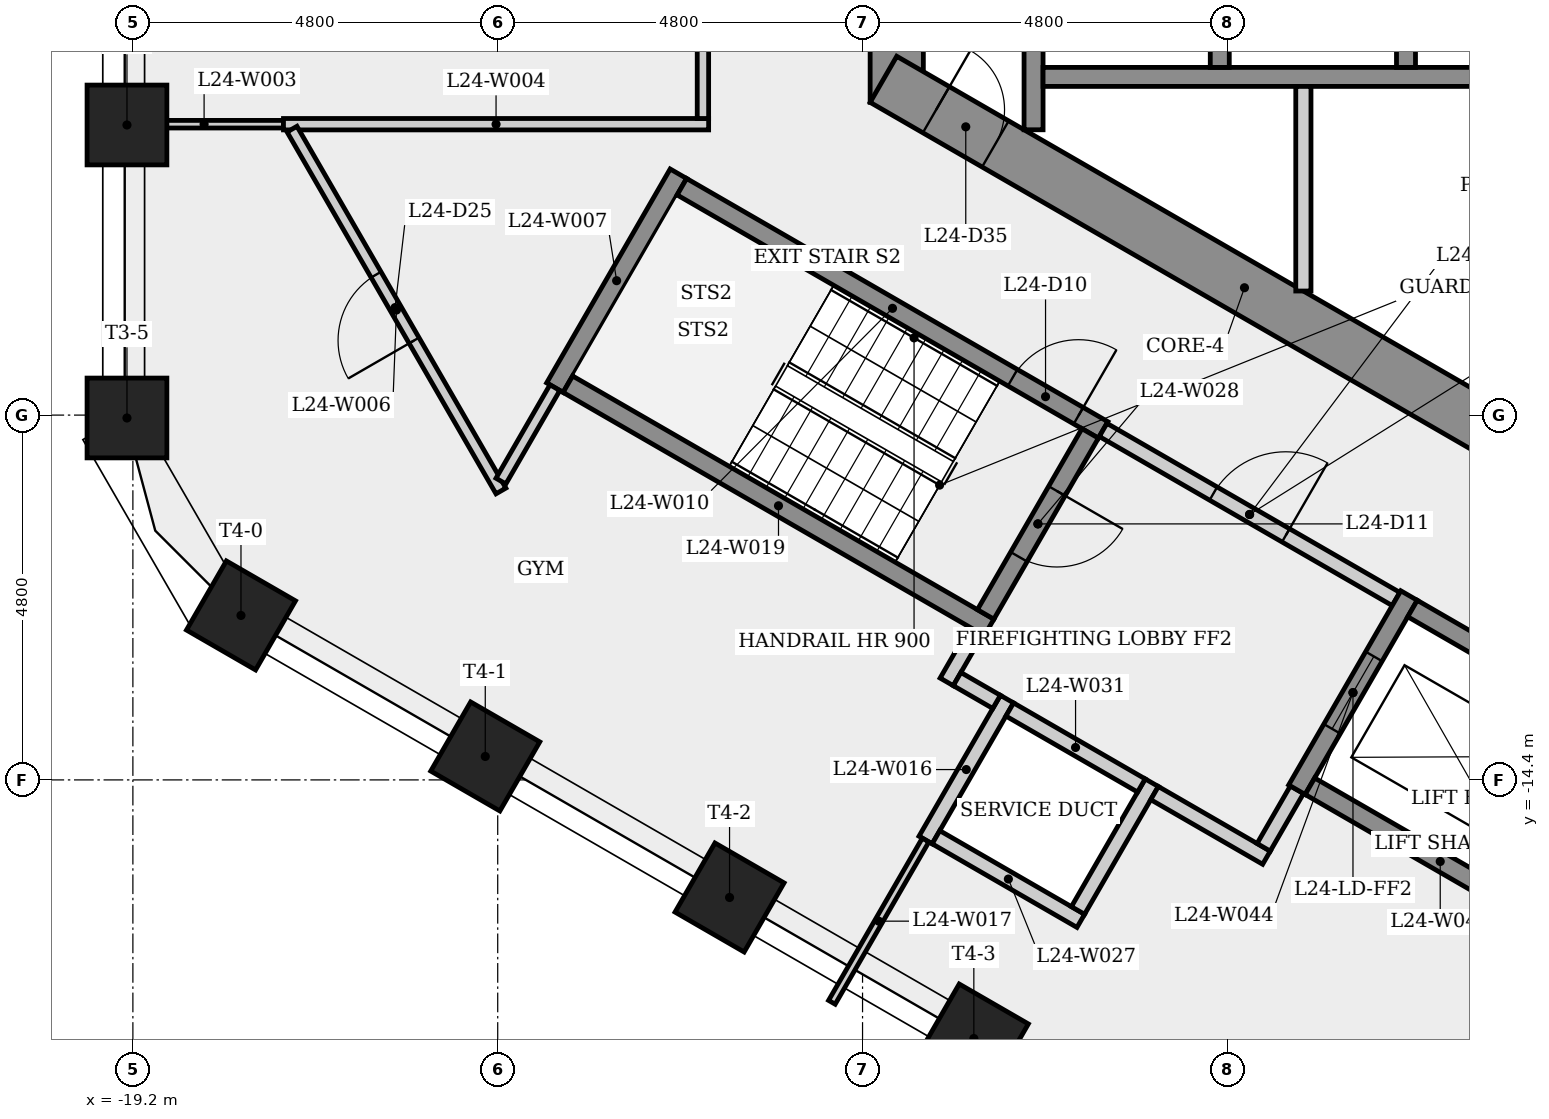
"""IFC4 building model, lengths in metres.
Left out: names, types, materials, properties, quantities, classifications, styles, units other than length and angle.
Written with IfcOpenShell. Run it as: python <this file> out.ifc"""

import sys

from ifc_helpers import new_model, si_unit, direction, frame, frame_2d, origin, origin_2d, place, context, subcontext, project, spatial, rectangle, extrude, element, fill, save


model = new_model("IFC4")
c1 = context("Model", 3, precision=1e-05, world=origin(), true_north=direction((0.0, 1.0)))
c2 = subcontext(c1, "Body", "Model", "MODEL_VIEW")
j1 = project(units=[si_unit("LENGTHUNIT", "METRE"), si_unit("PLANEANGLEUNIT", "RADIAN")], contexts=[c1])
p1 = place(None, origin())
s1 = spatial("IfcSite", under=j1, at=p1, CompositionType="ELEMENT")
p2 = place(p1, origin())
s2 = spatial("IfcBuilding", under=s1, at=p2, CompositionType="ELEMENT")
p3 = place(p2, frame((0.0, 0.0, 93.3)))
s3 = spatial("IfcBuildingStorey", under=s2, at=p3, CompositionType="ELEMENT", Elevation=93.3)
p4 = place(p3, frame((-9.15, 5.485, 0.0), z_axis=(0.0, 0.0, 1.0), x_axis=(0.0, -1.0, 0.0)))
e1 = element("IfcWall", 1, at=p4, inside=s3, PredefinedType="SHEAR", context=c2, shape_type="SweptSolid", body=[
    extrude(rectangle(XDim=10.97, YDim=0.7, at=frame_2d((5.485, 0.0))), origin(), (0.0, 0.0, 1.0), 3.4),
])
p5 = place(p4, frame((4.685, 0.0, 0.0)))
e2 = element("IfcOpeningElement", 2, at=p5, cuts=e1, PredefinedType="OPENING", context=c2, shape_type="SweptSolid", body=[
    extrude(rectangle(XDim=1.6, YDim=2.1, at=frame_2d((0.8, 1.05))), frame((0.0, 0.36, 0.0), z_axis=(0.0, -1.0, 0.0), x_axis=(1.0, 0.0, 0.0)), (0.0, 0.0, 1.0), 0.72),
])
p6 = place(p3, frame((-9.325, -5.182, 0.0), z_axis=(0.0, 0.0, 1.0), x_axis=(0.866023993627, -0.500002442456, 0.0)))
e3 = element("IfcWall", 3, at=p6, inside=s3, PredefinedType="SHEAR", context=c2, shape_type="SweptSolid", body=[
    extrude(rectangle(XDim=10.97, YDim=0.7, at=frame_2d((5.485, 0.0))), origin(), (0.0, 0.0, 1.0), 3.4),
])
p7 = place(p6, frame((0.801, 0.0, 0.0)))
e4 = element("IfcOpeningElement", 4, at=p7, cuts=e3, PredefinedType="OPENING", context=c2, shape_type="SweptSolid", body=[
    extrude(rectangle(XDim=0.9, YDim=2.1, at=frame_2d((0.45, 1.05))), frame((0.0, 0.36, 0.0), z_axis=(0.0, -1.0, 0.0), x_axis=(1.0, 0.0, 0.0)), (0.0, 0.0, 1.0), 0.72),
])
for number, where, z_axis, x_axis in (
    (5, (-19.278, -5.783, 0.0), (0.0, 0.0, 1.0), (-1.0, 0.0, 0.0)),
    (6, (-19.278, -9.638, 0.0), (0.0, 0.0, 1.0), (-1.0, 0.0, 0.0)),
    (7, (-17.778, -12.236, 0.0), (0.0, 0.0, 1.0), (-0.5, -0.866, 0.0)),
    (8, (-14.564, -14.092, 0.0), (0.0, 0.0, 1.0), (-0.5, -0.866, 0.0)),
    (9, (-11.35, -15.947, 0.0), (0.0, 0.0, 1.0), (-0.5, -0.866, 0.0)),
    (10, (-8.136, -17.803, 0.0), (0.0, 0.0, 1.0), (-0.5, -0.866, 0.0)),
):
    element("IfcColumn", number, at=place(p3, frame(where, z_axis=z_axis, x_axis=x_axis)), inside=s3, PredefinedType="COLUMN", context=c2, shape_type="SweptSolid", body=[
        extrude(rectangle(XDim=1.05, YDim=1.05, at=origin_2d()), origin(), (0.0, 0.0, 1.0), 3.4),
    ])
p8 = place(p3, frame((-17.219, -5.772, 0.0), z_axis=(0.0, 0.0, 1.0), x_axis=(-1.0, 0.0, 0.0)))
e11 = element("IfcWall", 11, at=p8, inside=s3, PredefinedType="PARTITIONING", context=c2, shape_type="SweptSolid", body=[
    extrude(rectangle(XDim=2.089, YDim=0.1, at=frame_2d((1.044, 0.0))), origin(), (0.0, 0.0, 1.0), 3.05),
])
p9 = place(p3, frame((-17.219, -5.772, 0.0), z_axis=(0.0, 0.0, 1.0), x_axis=(1.0, 0.0, 0.0)))
e12 = element("IfcWall", 12, at=p9, inside=s3, PredefinedType="PARTITIONING", context=c2, shape_type="SweptSolid", body=[
    extrude(rectangle(XDim=5.594, YDim=0.15, at=frame_2d((2.797, 0.0))), origin(), (0.0, 0.0, 1.0), 3.05),
])
p10 = place(p3, frame((-14.358, -10.598, 0.0), z_axis=(0.0, 0.0, 1.0), x_axis=(-0.499988999718, 0.866031754707, 0.0)))
e13 = element("IfcWall", 13, at=p10, inside=s3, PredefinedType="PARTITIONING", context=c2, shape_type="SweptSolid", body=[
    extrude(rectangle(XDim=5.497, YDim=0.15, at=frame_2d((2.749, 0.0))), origin(), (0.0, 0.0, 1.0), 3.05),
])
p11 = place(p10, frame((2.286, 0.0, 0.0)))
e14 = element("IfcOpeningElement", 14, at=p11, cuts=e13, PredefinedType="OPENING", context=c2, shape_type="SweptSolid", body=[
    extrude(rectangle(XDim=1.0, YDim=2.1, at=frame_2d((0.5, 1.05))), frame((0.0, 0.085, 0.0), z_axis=(0.0, -1.0, 0.0), x_axis=(1.0, 0.0, 0.0)), (0.0, 0.0, 1.0), 0.17),
])
p12 = place(p3, frame((-13.648, -9.239, 0.0), z_axis=(0.0, 0.0, 1.0), x_axis=(0.500017246033, 0.866015446554, 0.0)))
e15 = element("IfcWall", 15, at=p12, inside=s3, PredefinedType="SHEAR", context=c2, shape_type="SweptSolid", body=[
    extrude(rectangle(XDim=3.25, YDim=0.25, at=frame_2d((1.625, 0.0))), origin(), (0.0, 0.0, 1.0), 3.05),
])
p13 = place(p3, frame((-13.648, -9.239, 0.0), z_axis=(0.0, 0.0, 1.0), x_axis=(-0.500059846627, -0.865990848561, 0.0)))
e16 = element("IfcWall", 16, at=p13, inside=s3, PredefinedType="PARTITIONING", context=c2, shape_type="SweptSolid", body=[
    extrude(rectangle(XDim=1.42, YDim=0.15, at=frame_2d((0.71, 0.0))), origin(), (0.0, 0.0, 1.0), 3.05),
])
p14 = place(p3, frame((-11.977, -6.595, 0.0), z_axis=(0.0, 0.0, 1.0), x_axis=(0.866025499775, -0.499999833739, 0.0)))
e17 = element("IfcWall", 17, at=p14, inside=s3, PredefinedType="SHEAR", context=c2, shape_type="SweptSolid", body=[
    extrude(rectangle(XDim=6.4, YDim=0.25, at=frame_2d((3.2, 0.0))), origin(), (0.0, 0.0, 1.0), 3.05),
])
p15 = place(p14, frame((5.025, 0.0, 0.0)))
e18 = element("IfcOpeningElement", 18, at=p15, cuts=e17, PredefinedType="OPENING", context=c2, shape_type="SweptSolid", body=[
    extrude(rectangle(XDim=1.0, YDim=2.1, at=frame_2d((0.5, 1.05))), frame((0.0, 0.135, 0.0), z_axis=(0.0, -1.0, 0.0), x_axis=(1.0, 0.0, 0.0)), (0.0, 0.0, 1.0), 0.27),
])
p16 = place(p3, frame((-11.7, -5.698, 0.0), z_axis=(0.0, 0.0, 1.0), x_axis=(0.0, 1.0, 0.0)))
e19 = element("IfcWall", 19, at=p16, inside=s3, PredefinedType="PARTITIONING", context=c2, shape_type="SweptSolid", body=[
    extrude(rectangle(XDim=11.395, YDim=0.15, at=frame_2d((5.698, 0.0))), origin(), (0.0, 0.0, 1.0), 3.05),
])
p17 = place(p16, frame((8.061, 0.0, 0.0)))
e20 = element("IfcOpeningElement", 20, at=p17, cuts=e19, PredefinedType="OPENING", context=c2, shape_type="SweptSolid", body=[
    extrude(rectangle(XDim=1.0, YDim=2.1, at=frame_2d((0.5, 1.05))), frame((0.0, 0.085, 0.0), z_axis=(0.0, -1.0, 0.0), x_axis=(1.0, 0.0, 0.0)), (0.0, 0.0, 1.0), 0.17),
])
p18 = place(p16, frame((2.334, 0.0, 0.0)))
e21 = element("IfcOpeningElement", 21, at=p18, cuts=e19, PredefinedType="OPENING", context=c2, shape_type="SweptSolid", body=[
    extrude(rectangle(XDim=1.0, YDim=2.1, at=frame_2d((0.5, 1.05))), frame((0.0, 0.085, 0.0), z_axis=(0.0, -1.0, 0.0), x_axis=(1.0, 0.0, 0.0)), (0.0, 0.0, 1.0), 0.17),
])
p19 = place(p3, frame((-8.771, -15.191, 0.0), z_axis=(0.0, 0.0, 1.0), x_axis=(0.500051491514, 0.865995673104, 0.0)))
e22 = element("IfcWall", 22, at=p19, inside=s3, PredefinedType="PLUMBINGWALL", context=c2, shape_type="SweptSolid", body=[
    extrude(rectangle(XDim=2.141, YDim=0.2, at=frame_2d((1.07, 0.0))), origin(), (0.0, 0.0, 1.0), 3.05),
])
p20 = place(p3, frame((-8.771, -15.191, 0.0), z_axis=(0.0, 0.0, 1.0), x_axis=(-0.500036725936, -0.866004199017, 0.0)))
e23 = element("IfcWall", 23, at=p20, inside=s3, PredefinedType="PARTITIONING", context=c2, shape_type="SweptSolid", body=[
    extrude(rectangle(XDim=2.466, YDim=0.1, at=frame_2d((1.233, 0.0))), origin(), (0.0, 0.0, 1.0), 3.05),
])
p21 = place(p3, frame((-8.493, -13.11, 0.0), z_axis=(0.0, 0.0, 1.0), x_axis=(0.500067724834, 0.865986299303, 0.0)))
e24 = element("IfcWall", 24, at=p21, inside=s3, PredefinedType="PARTITIONING", context=c2, shape_type="SweptSolid", body=[
    extrude(rectangle(XDim=0.775, YDim=0.2, at=frame_2d((0.388, 0.0))), origin(), (0.0, 0.0, 1.0), 3.05),
])
p22 = place(p3, frame((-7.935, -12.393, 0.0), z_axis=(0.0, 0.0, 1.0), x_axis=(-0.866025499775, 0.499999833739, 0.0)))
e25 = element("IfcWall", 25, at=p22, inside=s3, PredefinedType="SHEAR", context=c2, shape_type="SweptSolid", body=[
    extrude(rectangle(XDim=6.4, YDim=0.25, at=frame_2d((3.2, 0.0))), origin(), (0.0, 0.0, 1.0), 3.05),
])
p23 = place(p3, frame((-7.836, -13.373, 0.0), z_axis=(0.0, 0.0, 1.0), x_axis=(-0.866232998003, 0.499640263761, 0.0)))
e26 = element("IfcWall", 26, at=p23, inside=s3, PredefinedType="PARTITIONING", context=c2, shape_type="SweptSolid", body=[
    extrude(rectangle(XDim=0.6, YDim=0.2, at=frame_2d((0.3, 0.0))), origin(), (0.0, 0.0, 1.0), 3.05),
])
p24 = place(p3, frame((-7.35, -5.846, 0.0), z_axis=(0.0, 0.0, 1.0), x_axis=(0.0, 1.0, 0.0)))
e27 = element("IfcWall", 27, at=p24, inside=s3, PredefinedType="SHEAR", context=c2, shape_type="SweptSolid", body=[
    extrude(rectangle(XDim=4.171, YDim=0.25, at=frame_2d((2.085, 0.0))), origin(), (0.0, 0.0, 1.0), 3.05),
])
p25 = place(p3, frame((-6.729, -16.254, 0.0), z_axis=(0.0, 0.0, 1.0), x_axis=(-0.86598042715, 0.500077893725, 0.0)))
e28 = element("IfcWall", 28, at=p25, inside=s3, PredefinedType="PLUMBINGWALL", context=c2, shape_type="SweptSolid", body=[
    extrude(rectangle(XDim=2.2, YDim=0.2, at=frame_2d((1.1, 0.0))), origin(), (0.0, 0.0, 1.0), 3.05),
])
p26 = place(p3, frame((-6.605, -9.841, 0.0), z_axis=(0.0, 0.0, 1.0), x_axis=(-0.499996545922, -0.866027397988, 0.0)))
e29 = element("IfcWall", 29, at=p26, inside=s3, PredefinedType="SHEAR", context=c2, shape_type="SweptSolid", body=[
    extrude(rectangle(XDim=2.75, YDim=0.25, at=frame_2d((1.375, 0.0))), origin(), (0.0, 0.0, 1.0), 3.05),
])
p27 = place(p26, frame((0.875, 0.0, 0.0)))
e30 = element("IfcOpeningElement", 30, at=p27, cuts=e29, PredefinedType="OPENING", context=c2, shape_type="SweptSolid", body=[
    extrude(rectangle(XDim=1.0, YDim=2.1, at=frame_2d((0.5, 1.05))), frame((0.0, 0.135, 0.0), z_axis=(0.0, -1.0, 0.0), x_axis=(1.0, 0.0, 0.0)), (0.0, 0.0, 1.0), 0.27),
])
p28 = place(p3, frame((-6.435, -9.795, 0.0), z_axis=(0.0, 0.0, 1.0), x_axis=(0.866012907634, -0.500021643343, 0.0)))
e31 = element("IfcWall", 31, at=p28, inside=s3, PredefinedType="PARTITIONING", context=c2, shape_type="SweptSolid", body=[
    extrude(rectangle(XDim=4.45, YDim=0.2, at=frame_2d((2.225, 0.0))), origin(), (0.0, 0.0, 1.0), 3.05),
])
p29 = place(p28, frame((1.675, 0.0, 0.0)))
e32 = element("IfcOpeningElement", 32, at=p29, cuts=e31, PredefinedType="OPENING", context=c2, shape_type="SweptSolid", body=[
    extrude(rectangle(XDim=1.1, YDim=2.1, at=frame_2d((0.55, 1.05))), frame((0.0, 0.11, 0.0), z_axis=(0.0, -1.0, 0.0), x_axis=(1.0, 0.0, 0.0)), (0.0, 0.0, 1.0), 0.22),
])
p30 = place(p3, frame((-5.795, -14.437, 0.0), z_axis=(0.0, 0.0, 1.0), x_axis=(-0.500034525977, -0.866005469285, 0.0)))
e33 = element("IfcWall", 33, at=p30, inside=s3, PredefinedType="PLUMBINGWALL", context=c2, shape_type="SweptSolid", body=[
    extrude(rectangle(XDim=1.941, YDim=0.2, at=frame_2d((0.971, 0.0))), origin(), (0.0, 0.0, 1.0), 3.05),
])
p31 = place(p3, frame((-5.931, -14.473, 0.0), z_axis=(0.0, 0.0, 1.0), x_axis=(-0.866041268327, 0.499972520799, 0.0)))
e34 = element("IfcWall", 34, at=p31, inside=s3, PredefinedType="PLUMBINGWALL", context=c2, shape_type="SweptSolid", body=[
    extrude(rectangle(XDim=2.0, YDim=0.2, at=frame_2d((1.0, 0.0))), origin(), (0.0, 0.0, 1.0), 3.05),
])
p32 = place(p3, frame((-7.225, -5.15, 0.0), z_axis=(0.0, 0.0, 1.0), x_axis=(1.0, 0.0, 0.0)))
e35 = element("IfcWall", 35, at=p32, inside=s3, PredefinedType="SHEAR", context=c2, shape_type="SweptSolid", body=[
    extrude(rectangle(XDim=14.7, YDim=0.25, at=frame_2d((7.35, 0.0))), origin(), (0.0, 0.0, 1.0), 3.05),
])
p33 = place(p3, frame((-4.9, -1.925, 0.0), z_axis=(0.0, 0.0, 1.0), x_axis=(0.0, -1.0, 0.0)))
e36 = element("IfcWall", 36, at=p33, inside=s3, PredefinedType="SHEAR", context=c2, shape_type="SweptSolid", body=[
    extrude(rectangle(XDim=3.1, YDim=0.25, at=frame_2d((1.55, 0.0))), origin(), (0.0, 0.0, 1.0), 3.4),
])
p34 = place(p3, frame((-4.286, -15.423, 0.0), z_axis=(0.0, 0.0, 1.0), x_axis=(-0.866025371046, 0.500000056704, 0.0)))
e37 = element("IfcWall", 37, at=p34, inside=s3, PredefinedType="PARTITIONING", context=c2, shape_type="SweptSolid", body=[
    extrude(rectangle(XDim=1.7, YDim=0.2, at=frame_2d((0.85, 0.0))), origin(), (0.0, 0.0, 1.0), 3.05),
])
p35 = place(p3, frame((-3.885, -14.529, 0.0), z_axis=(0.0, 0.0, 1.0), x_axis=(-0.499859285417, -0.866106630146, 0.0)))
e38 = element("IfcWall", 38, at=p35, inside=s3, PredefinedType="PARTITIONING", context=c2, shape_type="SweptSolid", body=[
    extrude(rectangle(XDim=0.875, YDim=0.2, at=frame_2d((0.438, 0.0))), origin(), (0.0, 0.0, 1.0), 3.05),
])
p36 = place(p3, frame((-3.8, -5.275, 0.0), z_axis=(0.0, 0.0, 1.0), x_axis=(0.0, -1.0, 0.0)))
e39 = element("IfcWall", 39, at=p36, inside=s3, PredefinedType="PARTITIONING", context=c2, shape_type="SweptSolid", body=[
    extrude(rectangle(XDim=2.692, YDim=0.2, at=frame_2d((1.346, 0.0))), origin(), (0.0, 0.0, 1.0), 3.05),
])
p37 = place(p3, frame((-2.41, -11.974, 0.0), z_axis=(0.0, 0.0, 1.0), x_axis=(-0.500001826776, -0.866024349092, 0.0)))
e40 = element("IfcWall", 40, at=p37, inside=s3, PredefinedType="SHEAR", context=c2, shape_type="SweptSolid", body=[
    extrude(rectangle(XDim=2.95, YDim=0.25, at=frame_2d((1.475, 0.0))), origin(), (0.0, 0.0, 1.0), 3.05),
])
p38 = place(p37, frame((0.925, 0.0, 0.0)))
e41 = element("IfcOpeningElement", 41, at=p38, cuts=e40, PredefinedType="OPENING", context=c2, shape_type="SweptSolid", body=[
    extrude(rectangle(XDim=1.1, YDim=2.1, at=frame_2d((0.55, 1.05))), frame((0.0, 0.135, 0.0), z_axis=(0.0, -1.0, 0.0), x_axis=(1.0, 0.0, 0.0)), (0.0, 0.0, 1.0), 0.27),
])
p39 = place(p3, frame((-2.364, -12.145, 0.0), z_axis=(0.0, 0.0, 1.0), x_axis=(0.86603892542, -0.499976579108, 0.0)))
e42 = element("IfcWall", 42, at=p39, inside=s3, PredefinedType="SHEAR", context=c2, shape_type="SweptSolid", body=[
    extrude(rectangle(XDim=2.162, YDim=0.25, at=frame_2d((1.081, 0.0))), origin(), (0.0, 0.0, 1.0), 3.05),
])
p40 = place(p3, frame((-2.45, -1.925, 0.0), z_axis=(0.0, 0.0, 1.0), x_axis=(0.0, -1.0, 0.0)))
e43 = element("IfcWall", 43, at=p40, inside=s3, PredefinedType="SHEAR", context=c2, shape_type="SweptSolid", body=[
    extrude(rectangle(XDim=3.1, YDim=0.25, at=frame_2d((1.55, 0.0))), origin(), (0.0, 0.0, 1.0), 3.4),
])
p41 = place(p3, frame((-0.856, -16.133, 0.0), z_axis=(0.0, 0.0, 1.0), x_axis=(-0.866021716278, 0.500006386895, 0.0)))
e44 = element("IfcWall", 44, at=p41, inside=s3, PredefinedType="SHEAR", context=c2, shape_type="SweptSolid", body=[
    extrude(rectangle(XDim=3.3, YDim=0.25, at=frame_2d((1.65, 0.0))), origin(), (0.0, 0.0, 1.0), 3.05),
])
p42 = place(p15, origin())
e45 = element("IfcDoor", 45, at=p42, inside=s3, OperationType="SINGLE_SWING_RIGHT", PredefinedType="DOOR", context=c2, shape_type="SweptSolid", body=[
    extrude(rectangle(XDim=1.0, YDim=2.1, at=frame_2d((0.5, 1.05))), frame((0.0, 0.025, 0.0), z_axis=(0.0, -1.0, 0.0), x_axis=(1.0, 0.0, 0.0)), (0.0, 0.0, 1.0), 0.05),
])
fill(e18, e45)
p43 = place(p27, origin())
e46 = element("IfcDoor", 46, at=p43, inside=s3, OperationType="SINGLE_SWING_LEFT", PredefinedType="DOOR", context=c2, shape_type="SweptSolid", body=[
    extrude(rectangle(XDim=1.0, YDim=2.1, at=frame_2d((0.5, 1.05))), frame((0.0, 0.025, 0.0), z_axis=(0.0, -1.0, 0.0), x_axis=(1.0, 0.0, 0.0)), (0.0, 0.0, 1.0), 0.05),
])
fill(e30, e46)
p44 = place(p29, origin())
e47 = element("IfcDoor", 47, at=p44, inside=s3, OperationType="SINGLE_SWING_RIGHT", PredefinedType="DOOR", context=c2, shape_type="SweptSolid", body=[
    extrude(rectangle(XDim=1.1, YDim=2.1, at=frame_2d((0.55, 1.05))), frame((0.0, 0.025, 0.0), z_axis=(0.0, -1.0, 0.0), x_axis=(1.0, 0.0, 0.0)), (0.0, 0.0, 1.0), 0.05),
])
fill(e32, e47)
p45 = place(p38, origin())
e48 = element("IfcDoor", 48, at=p45, inside=s3, OperationType="SLIDING_TO_LEFT", PredefinedType="DOOR", context=c2, shape_type="SweptSolid", body=[
    extrude(rectangle(XDim=1.1, YDim=2.1, at=frame_2d((0.55, 1.05))), frame((0.0, 0.025, 0.0), z_axis=(0.0, -1.0, 0.0), x_axis=(1.0, 0.0, 0.0)), (0.0, 0.0, 1.0), 0.05),
])
fill(e41, e48)
p46 = place(p11, origin())
e49 = element("IfcDoor", 49, at=p46, inside=s3, OperationType="SINGLE_SWING_LEFT", PredefinedType="DOOR", context=c2, shape_type="SweptSolid", body=[
    extrude(rectangle(XDim=1.0, YDim=2.1, at=frame_2d((0.5, 1.05))), frame((0.0, 0.025, 0.0), z_axis=(0.0, -1.0, 0.0), x_axis=(1.0, 0.0, 0.0)), (0.0, 0.0, 1.0), 0.05),
])
fill(e14, e49)
p47 = place(p7, origin())
e50 = element("IfcDoor", 50, at=p47, inside=s3, OperationType="SINGLE_SWING_LEFT", PredefinedType="DOOR", context=c2, shape_type="SweptSolid", body=[
    extrude(rectangle(XDim=0.9, YDim=2.1, at=frame_2d((0.45, 1.05))), frame((0.0, 0.025, 0.0), z_axis=(0.0, -1.0, 0.0), x_axis=(1.0, 0.0, 0.0)), (0.0, 0.0, 1.0), 0.05),
])
fill(e4, e50)
save(model, sys.argv[1])
